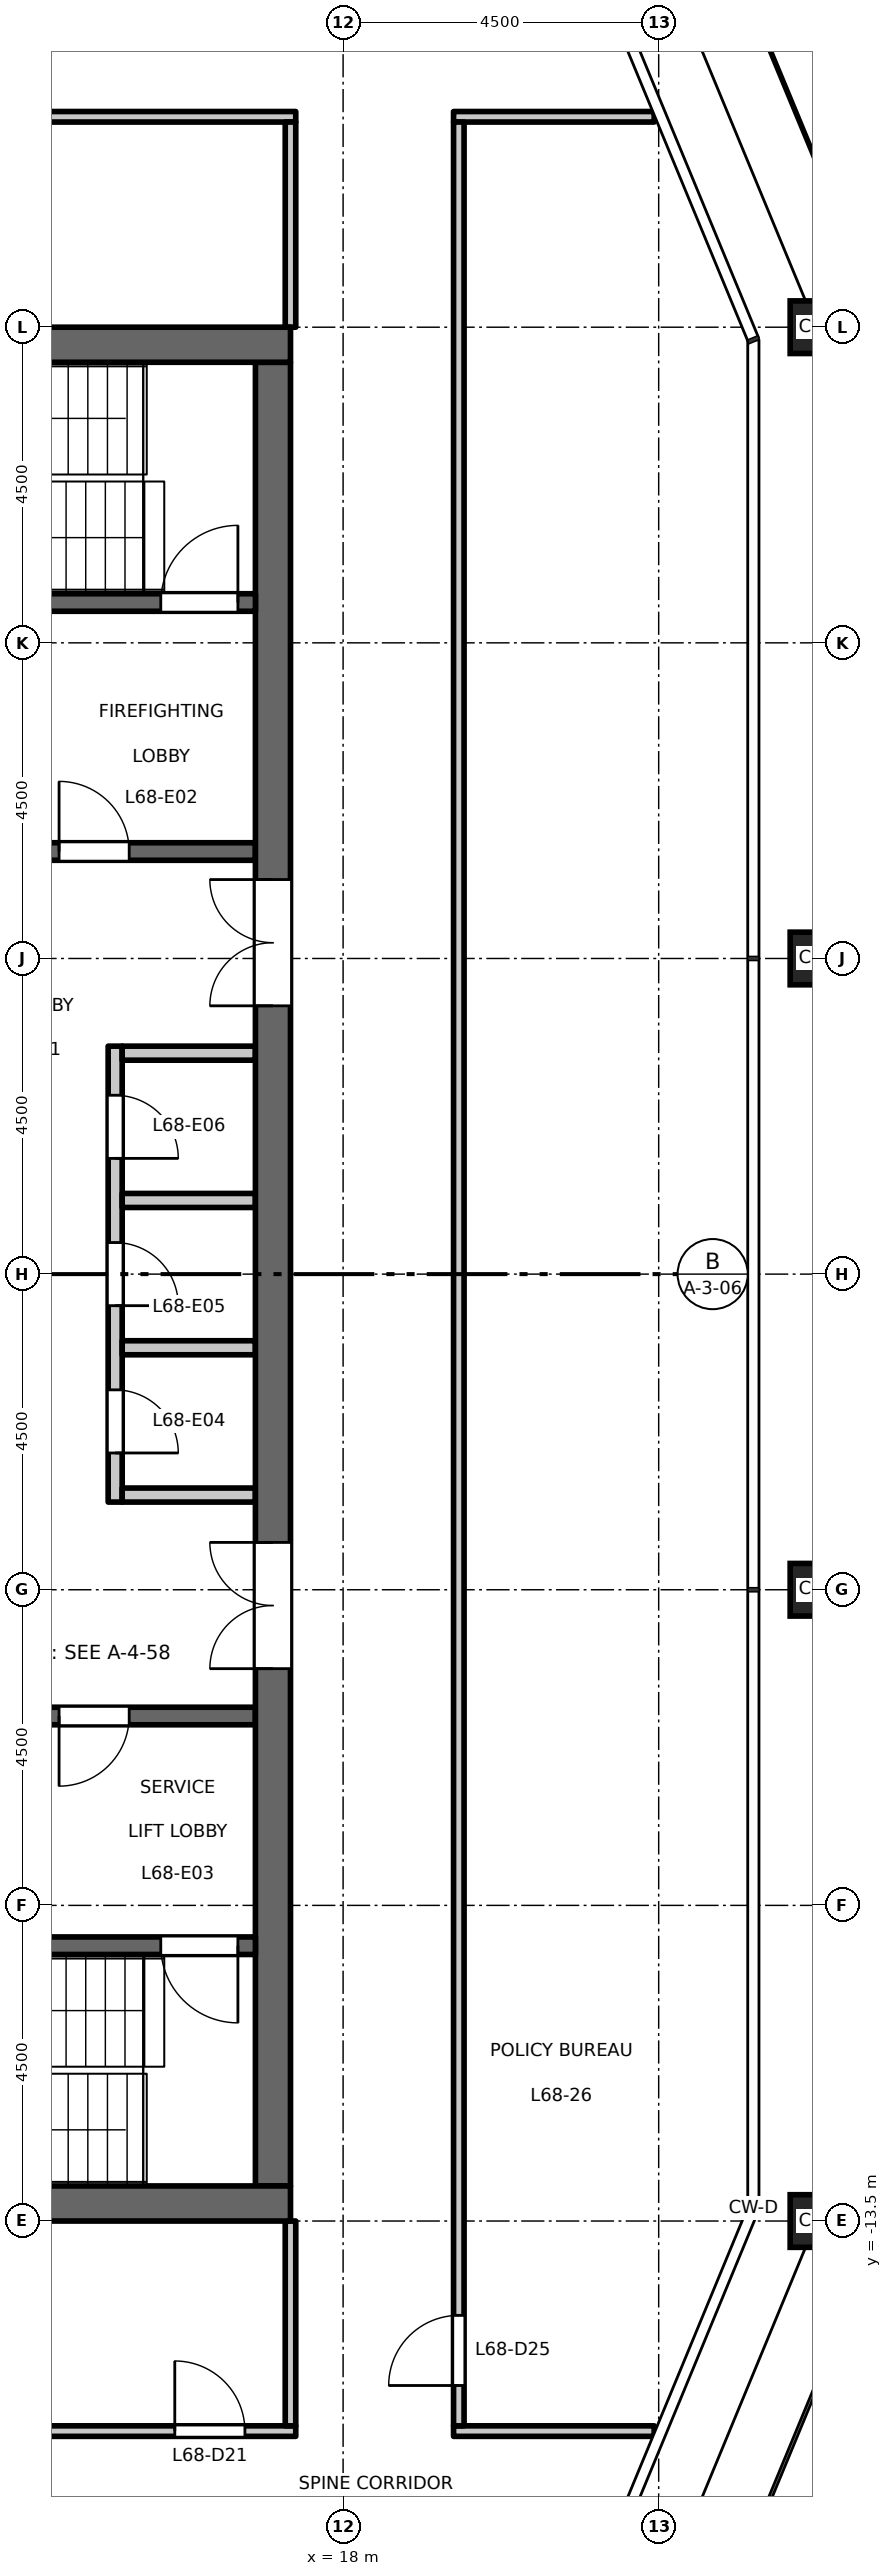
"""IFC4 building model, lengths in metres.
Left out: names, types, materials, properties, quantities, classifications, styles, units other than length and angle.
Written with IfcOpenShell. Run it as: python <this file> out.ifc"""

import sys

from ifc_helpers import new_model, si_unit, direction, frame, frame_2d, origin, origin_2d, place, context, subcontext, project, spatial, rectangle, hollow_rectangle, extrude, element, fill, save


model = new_model("IFC4")
c1 = context("Model", 3, precision=1e-05, world=origin(), true_north=direction((0.0, 1.0)))
c2 = subcontext(c1, "Body", "Model", "MODEL_VIEW")
j1 = project(units=[si_unit("LENGTHUNIT", "METRE"), si_unit("PLANEANGLEUNIT", "RADIAN")], contexts=[c1])
p1 = place(None, origin())
s1 = spatial("IfcSite", under=j1, at=p1, CompositionType="ELEMENT")
p2 = place(p1, origin())
s2 = spatial("IfcBuilding", under=s1, at=p2, CompositionType="ELEMENT")
p3 = place(p2, frame((0.0, 0.0, 316.7)))
s3 = spatial("IfcBuildingStorey", under=s2, at=p3, CompositionType="ELEMENT", Elevation=316.7)
for number, where, z_axis, x_axis in (
    (1, (24.75, -13.5, 0.0), (0.0, 0.0, 1.0), (1.0, 0.0, 0.0)),
    (2, (24.75, -4.5, 0.0), (0.0, 0.0, 1.0), (1.0, 0.0, 0.0)),
    (3, (24.75, 4.5, 0.0), (0.0, 0.0, 1.0), (1.0, 0.0, 0.0)),
    (4, (24.75, 13.5, 0.0), (0.0, 0.0, 1.0), (1.0, 0.0, 0.0)),
):
    element("IfcColumn", number, at=place(p3, frame(where, z_axis=z_axis, x_axis=x_axis)), inside=s3, PredefinedType="COLUMN", context=c2, shape_type="SweptSolid", body=[
        extrude(hollow_rectangle(XDim=0.75, YDim=0.75, WallThickness=0.04, at=origin_2d()), origin(), (0.0, 0.0, 1.0), 4.5),
    ])
p4 = place(p3, frame((14.75, -3.25, 0.0), z_axis=(0.0, 0.0, 1.0), x_axis=(0.0, 1.0, 0.0)))
e5 = element("IfcWall", 5, at=p4, inside=s3, PredefinedType="PARTITIONING", context=c2, shape_type="SweptSolid", body=[
    extrude(rectangle(XDim=6.5, YDim=0.2, at=frame_2d((3.25, 0.0))), origin(), (0.0, 0.0, 1.0), 4.35),
])
p5 = place(p4, frame((0.7, 0.0, 0.0)))
e6 = element("IfcOpeningElement", 6, at=p5, cuts=e5, PredefinedType="OPENING", context=c2, shape_type="SweptSolid", body=[
    extrude(rectangle(XDim=0.9, YDim=2.1, at=frame_2d((0.45, 1.05))), frame((0.0, 0.11, 0.0), z_axis=(0.0, -1.0, 0.0), x_axis=(1.0, 0.0, 0.0)), (0.0, 0.0, 1.0), 0.22),
])
p6 = place(p4, frame((2.8, 0.0, 0.0)))
e7 = element("IfcOpeningElement", 7, at=p6, cuts=e5, PredefinedType="OPENING", context=c2, shape_type="SweptSolid", body=[
    extrude(rectangle(XDim=0.9, YDim=2.1, at=frame_2d((0.45, 1.05))), frame((0.0, 0.11, 0.0), z_axis=(0.0, -1.0, 0.0), x_axis=(1.0, 0.0, 0.0)), (0.0, 0.0, 1.0), 0.22),
])
p7 = place(p4, frame((4.9, 0.0, 0.0)))
e8 = element("IfcOpeningElement", 8, at=p7, cuts=e5, PredefinedType="OPENING", context=c2, shape_type="SweptSolid", body=[
    extrude(rectangle(XDim=0.9, YDim=2.1, at=frame_2d((0.45, 1.05))), frame((0.0, 0.11, 0.0), z_axis=(0.0, -1.0, 0.0), x_axis=(1.0, 0.0, 0.0)), (0.0, 0.0, 1.0), 0.22),
])
for number, where, z_axis, x_axis in (
    (9, (14.85, 3.15, 0.0), (0.0, 0.0, 1.0), (1.0, 0.0, 0.0)),
    (10, (14.85, -3.15, 0.0), (0.0, 0.0, 1.0), (1.0, 0.0, 0.0)),
    (11, (14.85, -1.05, 0.0), (0.0, 0.0, 1.0), (1.0, 0.0, 0.0)),
    (12, (14.85, 1.05, 0.0), (0.0, 0.0, 1.0), (1.0, 0.0, 0.0)),
):
    element("IfcWall", number, at=place(p3, frame(where, z_axis=z_axis, x_axis=x_axis)), inside=s3, PredefinedType="PARTITIONING", context=c2, shape_type="SweptSolid", body=[
        extrude(rectangle(XDim=1.9, YDim=0.2, at=frame_2d((0.95, 0.0))), origin(), (0.0, 0.0, 1.0), 4.35),
    ])
p8 = place(p3, frame((12.15, 6.025, 0.0), z_axis=(0.0, 0.0, 1.0), x_axis=(1.0, 0.0, 0.0)))
e13 = element("IfcWall", 13, at=p8, inside=s3, PredefinedType="SHEAR", context=c2, shape_type="SweptSolid", body=[
    extrude(rectangle(XDim=4.6, YDim=0.25, at=frame_2d((2.3, 0.0))), origin(), (0.0, 0.0, 1.0), 4.35),
])
p9 = place(p8, frame((1.8, 0.0, 0.0)))
e14 = element("IfcOpeningElement", 14, at=p9, cuts=e13, PredefinedType="OPENING", context=c2, shape_type="SweptSolid", body=[
    extrude(rectangle(XDim=1.0, YDim=2.1, at=frame_2d((0.5, 1.05))), frame((0.0, 0.135, 0.0), z_axis=(0.0, -1.0, 0.0), x_axis=(1.0, 0.0, 0.0)), (0.0, 0.0, 1.0), 0.27),
])
p10 = place(p3, frame((12.15, -6.3, 0.0), z_axis=(0.0, 0.0, 1.0), x_axis=(1.0, 0.0, 0.0)))
e15 = element("IfcWall", 15, at=p10, inside=s3, PredefinedType="SHEAR", context=c2, shape_type="SweptSolid", body=[
    extrude(rectangle(XDim=4.6, YDim=0.25, at=frame_2d((2.3, 0.0))), origin(), (0.0, 0.0, 1.0), 4.35),
])
p11 = place(p10, frame((1.8, 0.0, 0.0)))
e16 = element("IfcOpeningElement", 16, at=p11, cuts=e15, PredefinedType="OPENING", context=c2, shape_type="SweptSolid", body=[
    extrude(rectangle(XDim=1.0, YDim=2.1, at=frame_2d((0.5, 1.05))), frame((0.0, 0.135, 0.0), z_axis=(0.0, -1.0, 0.0), x_axis=(1.0, 0.0, 0.0)), (0.0, 0.0, 1.0), 0.27),
])
p12 = place(p3, frame((17.0, -13.0, 0.0), z_axis=(0.0, 0.0, 1.0), x_axis=(0.0, 1.0, 0.0)))
e17 = element("IfcWall", 17, at=p12, inside=s3, PredefinedType="SHEAR", context=c2, shape_type="SweptSolid", body=[
    extrude(rectangle(XDim=26.0, YDim=0.5, at=frame_2d((13.0, 0.0))), origin(), (0.0, 0.0, 1.0), 4.35),
])
p13 = place(p12, frame((16.825, 0.0, 0.0)))
e18 = element("IfcOpeningElement", 18, at=p13, cuts=e17, PredefinedType="OPENING", context=c2, shape_type="SweptSolid", body=[
    extrude(rectangle(XDim=1.8, YDim=2.1, at=frame_2d((0.9, 1.05))), frame((0.0, 0.26, 0.0), z_axis=(0.0, -1.0, 0.0), x_axis=(1.0, 0.0, 0.0)), (0.0, 0.0, 1.0), 0.52),
])
p14 = place(p12, frame((7.375, 0.0, 0.0)))
e19 = element("IfcOpeningElement", 19, at=p14, cuts=e17, PredefinedType="OPENING", context=c2, shape_type="SweptSolid", body=[
    extrude(rectangle(XDim=1.8, YDim=2.1, at=frame_2d((0.9, 1.05))), frame((0.0, 0.26, 0.0), z_axis=(0.0, -1.0, 0.0), x_axis=(1.0, 0.0, 0.0)), (0.0, 0.0, 1.0), 0.52),
])
p15 = place(p3, frame((8.75, 9.575, 0.0), z_axis=(0.0, 0.0, 1.0), x_axis=(1.0, 0.0, 0.0)))
e20 = element("IfcWall", 20, at=p15, inside=s3, PredefinedType="SHEAR", context=c2, shape_type="SweptSolid", body=[
    extrude(rectangle(XDim=8.0, YDim=0.25, at=frame_2d((4.0, 0.0))), origin(), (0.0, 0.0, 1.0), 4.35),
])
p16 = place(p15, frame((6.65, 0.0, 0.0)))
e21 = element("IfcOpeningElement", 21, at=p16, cuts=e20, PredefinedType="OPENING", context=c2, shape_type="SweptSolid", body=[
    extrude(rectangle(XDim=1.1, YDim=2.1, at=frame_2d((0.55, 1.05))), frame((0.0, 0.135, 0.0), z_axis=(0.0, -1.0, 0.0), x_axis=(1.0, 0.0, 0.0)), (0.0, 0.0, 1.0), 0.27),
])
p17 = place(p3, frame((8.75, -9.575, 0.0), z_axis=(0.0, 0.0, 1.0), x_axis=(1.0, 0.0, 0.0)))
e22 = element("IfcWall", 22, at=p17, inside=s3, PredefinedType="SHEAR", context=c2, shape_type="SweptSolid", body=[
    extrude(rectangle(XDim=8.0, YDim=0.25, at=frame_2d((4.0, 0.0))), origin(), (0.0, 0.0, 1.0), 4.35),
])
p18 = place(p17, frame((6.65, 0.0, 0.0)))
e23 = element("IfcOpeningElement", 23, at=p18, cuts=e22, PredefinedType="OPENING", context=c2, shape_type="SweptSolid", body=[
    extrude(rectangle(XDim=1.1, YDim=2.1, at=frame_2d((0.55, 1.05))), frame((0.0, 0.135, 0.0), z_axis=(0.0, -1.0, 0.0), x_axis=(1.0, 0.0, 0.0)), (0.0, 0.0, 1.0), 0.27),
])
for number, where, z_axis, x_axis in (
    (24, (8.25, 13.25, 0.0), (0.0, 0.0, 1.0), (1.0, 0.0, 0.0)),
    (25, (8.25, -13.25, 0.0), (0.0, 0.0, 1.0), (1.0, 0.0, 0.0)),
):
    element("IfcWall", number, at=place(p3, frame(where, z_axis=z_axis, x_axis=x_axis)), inside=s3, PredefinedType="SHEAR", context=c2, shape_type="SweptSolid", body=[
        extrude(rectangle(XDim=9.0, YDim=0.5, at=frame_2d((4.5, 0.0))), origin(), (0.0, 0.0, 1.0), 4.35),
    ])
p19 = place(p3, frame((-17.325, -16.495, 0.0), z_axis=(0.0, 0.0, 1.0), x_axis=(1.0, 0.0, 0.0)))
e26 = element("IfcWall", 26, at=p19, inside=s3, PredefinedType="PARTITIONING", context=c2, shape_type="SweptSolid", body=[
    extrude(rectangle(XDim=34.65, YDim=0.15, at=frame_2d((17.325, 0.0))), origin(), (0.0, 0.0, 1.0), 4.35),
])
p20 = place(p19, frame((9.675, 0.0, 0.0)))
e27 = element("IfcOpeningElement", 27, at=p20, cuts=e26, PredefinedType="OPENING", context=c2, shape_type="SweptSolid", body=[
    extrude(rectangle(XDim=1.0, YDim=2.1, at=frame_2d((0.5, 1.05))), frame((0.0, 0.085, 0.0), z_axis=(0.0, -1.0, 0.0), x_axis=(1.0, 0.0, 0.0)), (0.0, 0.0, 1.0), 0.17),
])
p21 = place(p19, frame((23.925, 0.0, 0.0)))
e28 = element("IfcOpeningElement", 28, at=p21, cuts=e26, PredefinedType="OPENING", context=c2, shape_type="SweptSolid", body=[
    extrude(rectangle(XDim=1.0, YDim=2.1, at=frame_2d((0.5, 1.05))), frame((0.0, 0.085, 0.0), z_axis=(0.0, -1.0, 0.0), x_axis=(1.0, 0.0, 0.0)), (0.0, 0.0, 1.0), 0.17),
])
p22 = place(p19, frame((0.675, 0.0, 0.0)))
e29 = element("IfcOpeningElement", 29, at=p22, cuts=e26, PredefinedType="OPENING", context=c2, shape_type="SweptSolid", body=[
    extrude(rectangle(XDim=1.0, YDim=2.1, at=frame_2d((0.5, 1.05))), frame((0.0, 0.085, 0.0), z_axis=(0.0, -1.0, 0.0), x_axis=(1.0, 0.0, 0.0)), (0.0, 0.0, 1.0), 0.17),
])
p23 = place(p19, frame((32.925, 0.0, 0.0)))
e30 = element("IfcOpeningElement", 30, at=p23, cuts=e26, PredefinedType="OPENING", context=c2, shape_type="SweptSolid", body=[
    extrude(rectangle(XDim=1.0, YDim=2.1, at=frame_2d((0.5, 1.05))), frame((0.0, 0.085, 0.0), z_axis=(0.0, -1.0, 0.0), x_axis=(1.0, 0.0, 0.0)), (0.0, 0.0, 1.0), 0.17),
])
p24 = place(p3, frame((19.575, -16.495, 0.0), z_axis=(0.0, 0.0, 1.0), x_axis=(1.0, 0.0, 0.0)))
e31 = element("IfcWall", 31, at=p24, inside=s3, PredefinedType="PARTITIONING", context=c2, shape_type="SweptSolid", body=[
    extrude(rectangle(XDim=2.861, YDim=0.15, at=frame_2d((1.431, 0.0))), origin(), (0.0, 0.0, 1.0), 4.35),
])
p25 = place(p3, frame((-17.325, 16.5, 0.0), z_axis=(0.0, 0.0, 1.0), x_axis=(1.0, 0.0, 0.0)))
e32 = element("IfcWall", 32, at=p25, inside=s3, PredefinedType="PARTITIONING", context=c2, shape_type="SweptSolid", body=[
    extrude(rectangle(XDim=34.65, YDim=0.15, at=frame_2d((17.325, 0.0))), origin(), (0.0, 0.0, 1.0), 4.35),
])
p26 = place(p25, frame((9.725, 0.0, 0.0)))
e33 = element("IfcOpeningElement", 33, at=p26, cuts=e32, PredefinedType="OPENING", context=c2, shape_type="SweptSolid", body=[
    extrude(rectangle(XDim=1.0, YDim=2.1, at=frame_2d((0.5, 1.05))), frame((0.0, 0.085, 0.0), z_axis=(0.0, -1.0, 0.0), x_axis=(1.0, 0.0, 0.0)), (0.0, 0.0, 1.0), 0.17),
])
p27 = place(p25, frame((7.475, 0.0, 0.0)))
e34 = element("IfcOpeningElement", 34, at=p27, cuts=e32, PredefinedType="OPENING", context=c2, shape_type="SweptSolid", body=[
    extrude(rectangle(XDim=1.0, YDim=2.1, at=frame_2d((0.5, 1.05))), frame((0.0, 0.085, 0.0), z_axis=(0.0, -1.0, 0.0), x_axis=(1.0, 0.0, 0.0)), (0.0, 0.0, 1.0), 0.17),
])
p28 = place(p25, frame((26.225, 0.0, 0.0)))
e35 = element("IfcOpeningElement", 35, at=p28, cuts=e32, PredefinedType="OPENING", context=c2, shape_type="SweptSolid", body=[
    extrude(rectangle(XDim=1.0, YDim=2.1, at=frame_2d((0.5, 1.05))), frame((0.0, 0.085, 0.0), z_axis=(0.0, -1.0, 0.0), x_axis=(1.0, 0.0, 0.0)), (0.0, 0.0, 1.0), 0.17),
])
p29 = place(p3, frame((19.575, 16.5, 0.0), z_axis=(0.0, 0.0, 1.0), x_axis=(1.0, 0.0, 0.0)))
e36 = element("IfcWall", 36, at=p29, inside=s3, PredefinedType="PARTITIONING", context=c2, shape_type="SweptSolid", body=[
    extrude(rectangle(XDim=2.861, YDim=0.15, at=frame_2d((1.431, 0.0))), origin(), (0.0, 0.0, 1.0), 4.35),
])
p30 = place(p3, frame((17.25, -16.42, 0.0), z_axis=(0.0, 0.0, 1.0), x_axis=(0.0, 1.0, 0.0)))
e37 = element("IfcWall", 37, at=p30, inside=s3, PredefinedType="PARTITIONING", context=c2, shape_type="SweptSolid", body=[
    extrude(rectangle(XDim=2.92, YDim=0.15, at=frame_2d((1.46, 0.0))), origin(), (0.0, 0.0, 1.0), 4.35),
])
p31 = place(p3, frame((17.25, 13.5, 0.0), z_axis=(0.0, 0.0, 1.0), x_axis=(0.0, 1.0, 0.0)))
e38 = element("IfcWall", 38, at=p31, inside=s3, PredefinedType="PARTITIONING", context=c2, shape_type="SweptSolid", body=[
    extrude(rectangle(XDim=2.925, YDim=0.15, at=frame_2d((1.462, 0.0))), origin(), (0.0, 0.0, 1.0), 4.35),
])
p32 = place(p3, frame((19.65, -16.42, 0.0), z_axis=(0.0, 0.0, 1.0), x_axis=(0.0, 1.0, 0.0)))
e39 = element("IfcWall", 39, at=p32, inside=s3, PredefinedType="PARTITIONING", context=c2, shape_type="SweptSolid", body=[
    extrude(rectangle(XDim=32.845, YDim=0.15, at=frame_2d((16.422, 0.0))), origin(), (0.0, 0.0, 1.0), 4.35),
])
p33 = place(p32, frame((0.575, 0.0, 0.0)))
e40 = element("IfcOpeningElement", 40, at=p33, cuts=e39, PredefinedType="OPENING", context=c2, shape_type="SweptSolid", body=[
    extrude(rectangle(XDim=1.0, YDim=2.1, at=frame_2d((0.5, 1.05))), frame((0.0, 0.085, 0.0), z_axis=(0.0, -1.0, 0.0), x_axis=(1.0, 0.0, 0.0)), (0.0, 0.0, 1.0), 0.17),
])
p34 = place(p9, origin())
e41 = element("IfcDoor", 41, at=p34, inside=s3, OperationType="SINGLE_SWING_RIGHT", PredefinedType="DOOR", context=c2, shape_type="SweptSolid", body=[
    extrude(rectangle(XDim=1.0, YDim=2.1, at=frame_2d((0.5, 1.05))), frame((0.0, 0.025, 0.0), z_axis=(0.0, -1.0, 0.0), x_axis=(1.0, 0.0, 0.0)), (0.0, 0.0, 1.0), 0.05),
])
fill(e14, e41)
p35 = place(p11, origin())
e42 = element("IfcDoor", 42, at=p35, inside=s3, OperationType="SINGLE_SWING_LEFT", PredefinedType="DOOR", context=c2, shape_type="SweptSolid", body=[
    extrude(rectangle(XDim=1.0, YDim=2.1, at=frame_2d((0.5, 1.05))), frame((0.0, 0.025, 0.0), z_axis=(0.0, -1.0, 0.0), x_axis=(1.0, 0.0, 0.0)), (0.0, 0.0, 1.0), 0.05),
])
fill(e16, e42)
p36 = place(p16, origin())
e43 = element("IfcDoor", 43, at=p36, inside=s3, OperationType="SINGLE_SWING_LEFT", PredefinedType="DOOR", context=c2, shape_type="SweptSolid", body=[
    extrude(rectangle(XDim=1.1, YDim=2.1, at=frame_2d((0.55, 1.05))), frame((0.0, 0.025, 0.0), z_axis=(0.0, -1.0, 0.0), x_axis=(1.0, 0.0, 0.0)), (0.0, 0.0, 1.0), 0.05),
])
fill(e21, e43)
p37 = place(p18, origin())
e44 = element("IfcDoor", 44, at=p37, inside=s3, OperationType="SINGLE_SWING_RIGHT", PredefinedType="DOOR", context=c2, shape_type="SweptSolid", body=[
    extrude(rectangle(XDim=1.1, YDim=2.1, at=frame_2d((0.55, 1.05))), frame((0.0, 0.025, 0.0), z_axis=(0.0, -1.0, 0.0), x_axis=(1.0, 0.0, 0.0)), (0.0, 0.0, 1.0), 0.05),
])
fill(e23, e44)
p38 = place(p13, origin())
e45 = element("IfcDoor", 45, at=p38, inside=s3, OperationType="DOUBLE_DOOR_DOUBLE_SWING", PredefinedType="DOOR", context=c2, shape_type="SweptSolid", body=[
    extrude(rectangle(XDim=1.8, YDim=2.1, at=frame_2d((0.9, 1.05))), frame((0.0, 0.025, 0.0), z_axis=(0.0, -1.0, 0.0), x_axis=(1.0, 0.0, 0.0)), (0.0, 0.0, 1.0), 0.05),
])
fill(e18, e45)
p39 = place(p14, origin())
e46 = element("IfcDoor", 46, at=p39, inside=s3, OperationType="DOUBLE_DOOR_DOUBLE_SWING", PredefinedType="DOOR", context=c2, shape_type="SweptSolid", body=[
    extrude(rectangle(XDim=1.8, YDim=2.1, at=frame_2d((0.9, 1.05))), frame((0.0, 0.025, 0.0), z_axis=(0.0, -1.0, 0.0), x_axis=(1.0, 0.0, 0.0)), (0.0, 0.0, 1.0), 0.05),
])
fill(e19, e46)
p40 = place(p5, origin())
e47 = element("IfcDoor", 47, at=p40, inside=s3, OperationType="SINGLE_SWING_LEFT", PredefinedType="DOOR", context=c2, shape_type="SweptSolid", body=[
    extrude(rectangle(XDim=0.9, YDim=2.1, at=frame_2d((0.45, 1.05))), frame((0.0, 0.025, 0.0), z_axis=(0.0, -1.0, 0.0), x_axis=(1.0, 0.0, 0.0)), (0.0, 0.0, 1.0), 0.05),
])
fill(e6, e47)
p41 = place(p6, origin())
e48 = element("IfcDoor", 48, at=p41, inside=s3, OperationType="SINGLE_SWING_LEFT", PredefinedType="DOOR", context=c2, shape_type="SweptSolid", body=[
    extrude(rectangle(XDim=0.9, YDim=2.1, at=frame_2d((0.45, 1.05))), frame((0.0, 0.025, 0.0), z_axis=(0.0, -1.0, 0.0), x_axis=(1.0, 0.0, 0.0)), (0.0, 0.0, 1.0), 0.05),
])
fill(e7, e48)
p42 = place(p7, origin())
e49 = element("IfcDoor", 49, at=p42, inside=s3, OperationType="SINGLE_SWING_LEFT", PredefinedType="DOOR", context=c2, shape_type="SweptSolid", body=[
    extrude(rectangle(XDim=0.9, YDim=2.1, at=frame_2d((0.45, 1.05))), frame((0.0, 0.025, 0.0), z_axis=(0.0, -1.0, 0.0), x_axis=(1.0, 0.0, 0.0)), (0.0, 0.0, 1.0), 0.05),
])
fill(e8, e49)
p43 = place(p23, origin())
e50 = element("IfcDoor", 50, at=p43, inside=s3, OperationType="SINGLE_SWING_LEFT", PredefinedType="DOOR", context=c2, shape_type="SweptSolid", body=[
    extrude(rectangle(XDim=1.0, YDim=2.1, at=frame_2d((0.5, 1.05))), frame((0.0, 0.025, 0.0), z_axis=(0.0, -1.0, 0.0), x_axis=(1.0, 0.0, 0.0)), (0.0, 0.0, 1.0), 0.05),
])
fill(e30, e50)
p44 = place(p33, origin())
e51 = element("IfcDoor", 51, at=p44, inside=s3, OperationType="SINGLE_SWING_LEFT", PredefinedType="DOOR", context=c2, shape_type="SweptSolid", body=[
    extrude(rectangle(XDim=1.0, YDim=2.1, at=frame_2d((0.5, 1.05))), frame((0.0, 0.025, 0.0), z_axis=(0.0, -1.0, 0.0), x_axis=(1.0, 0.0, 0.0)), (0.0, 0.0, 1.0), 0.05),
])
fill(e40, e51)
save(model, sys.argv[1])
